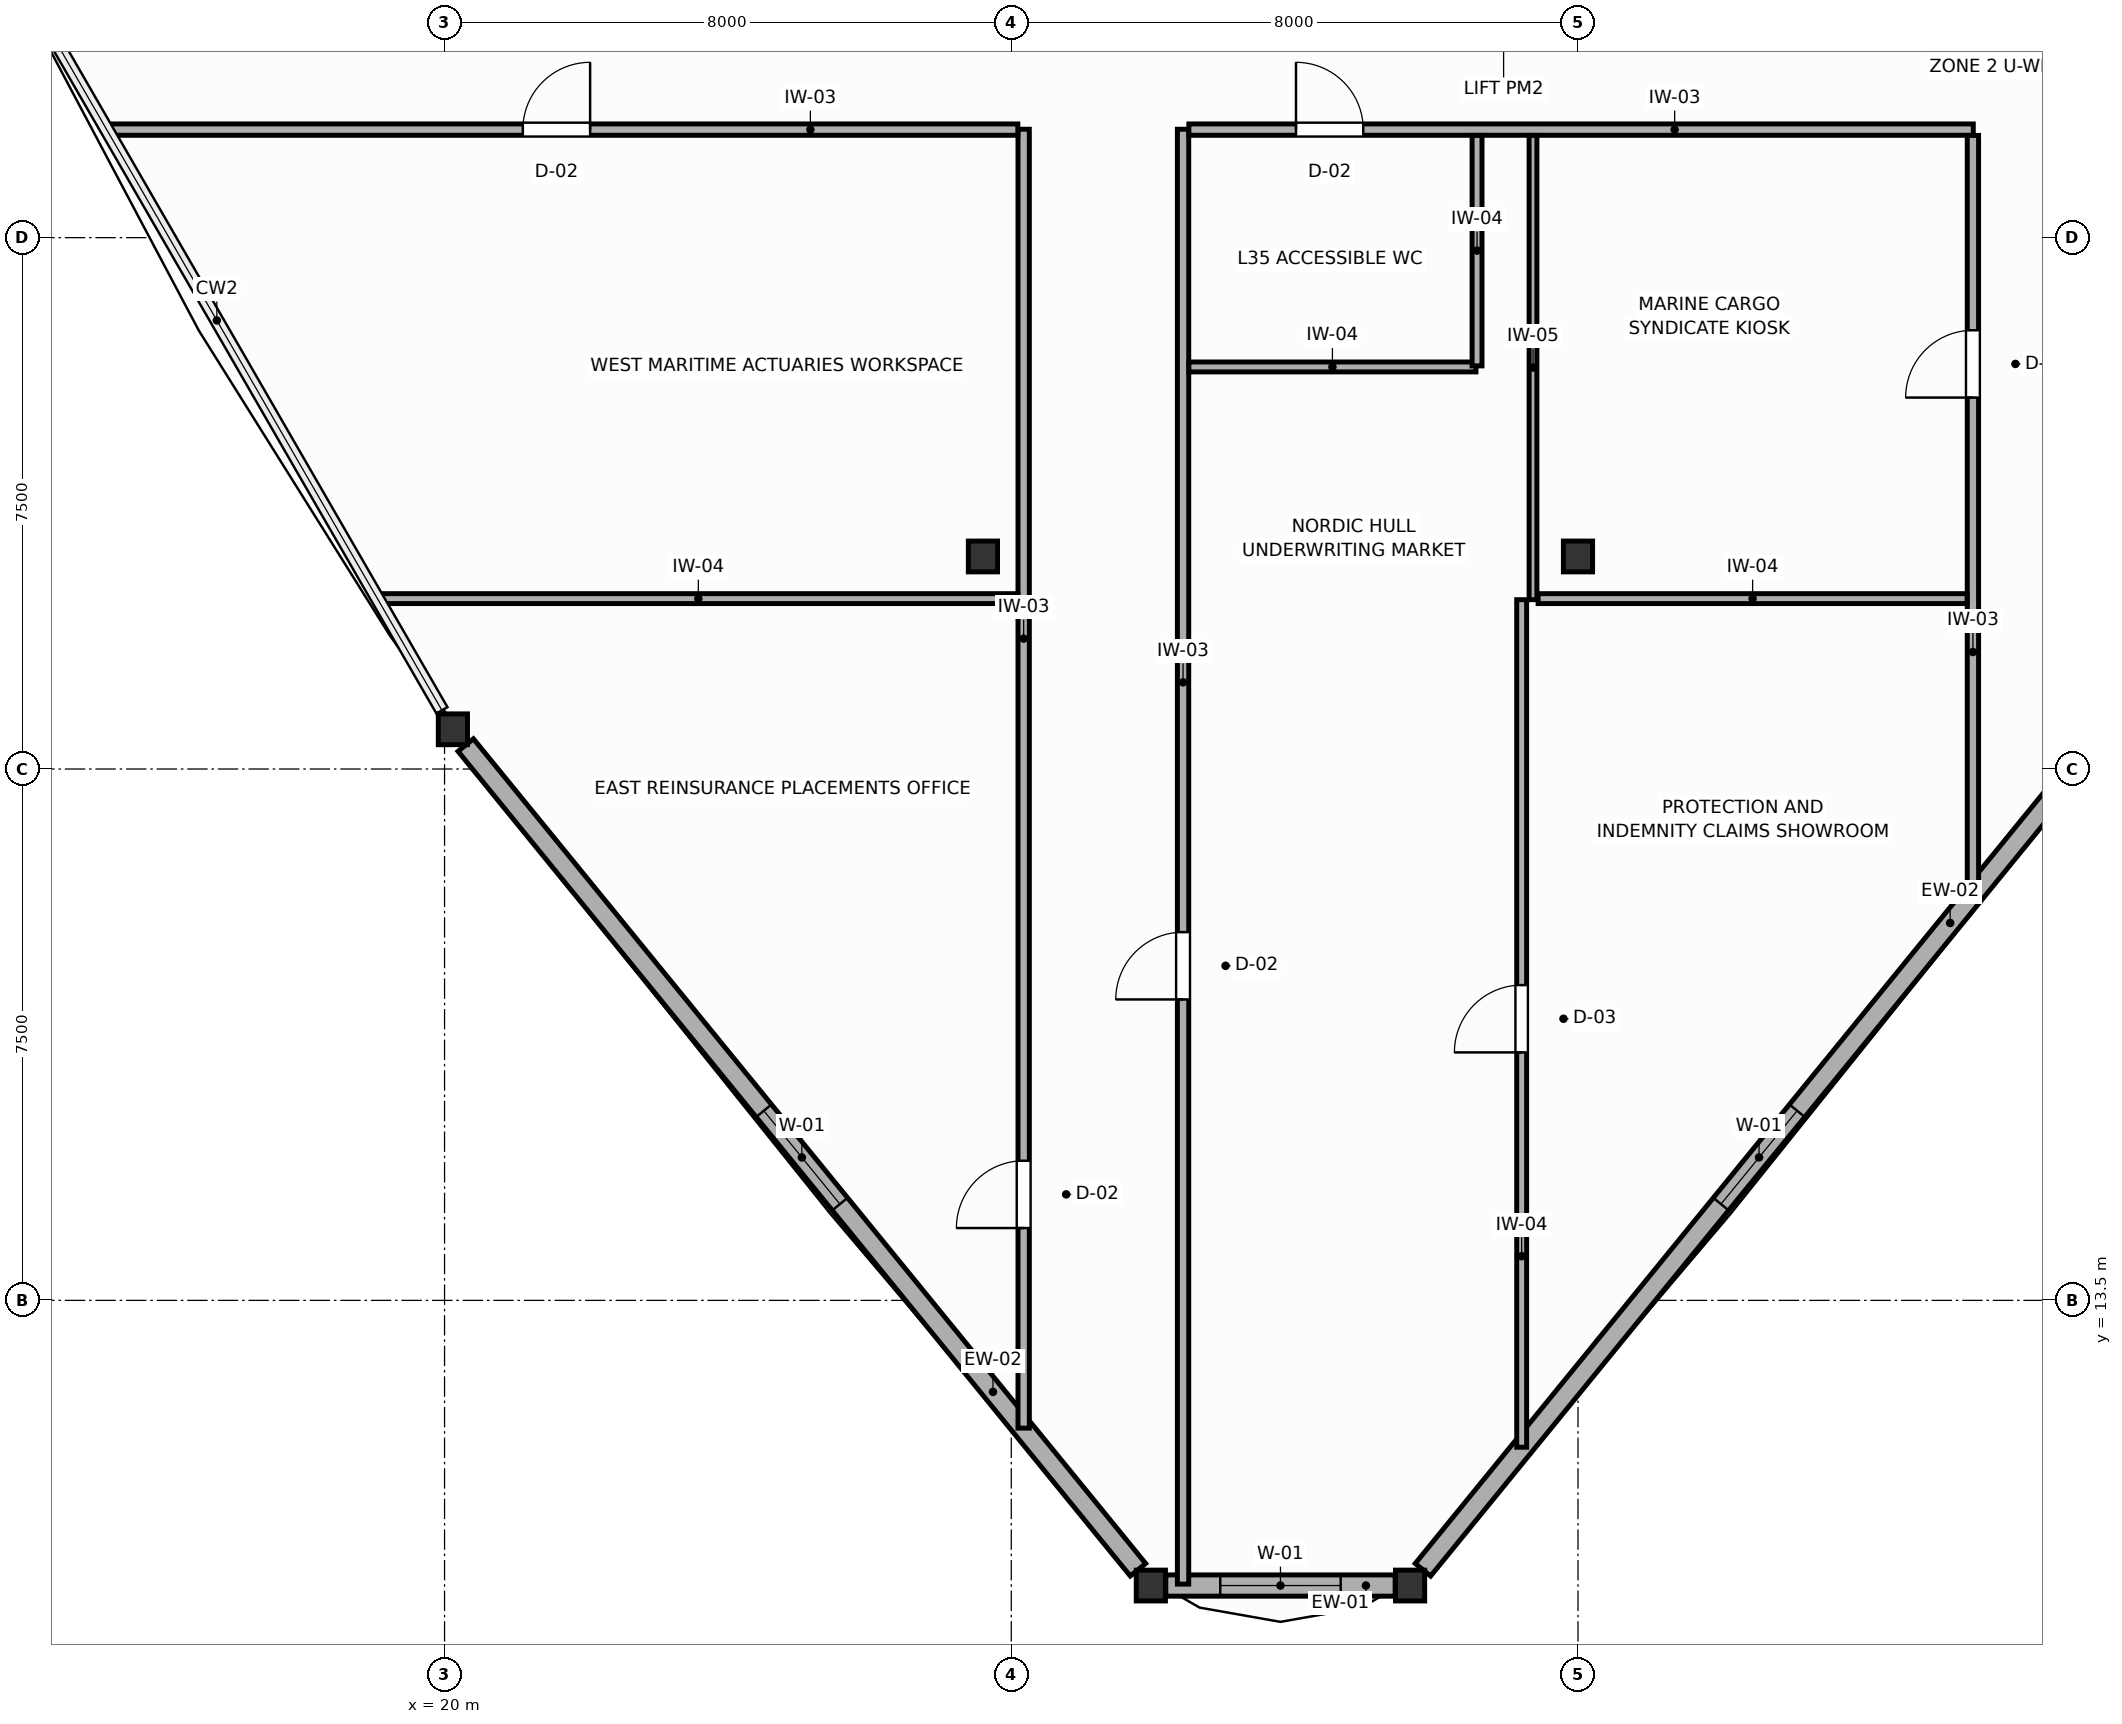
"""IFC4 building model, lengths in metres.
Left out: names, types, materials, properties, quantities, classifications, styles, units other than length and angle.
Written with IfcOpenShell. Run it as: python <this file> out.ifc"""

import sys

from ifc_helpers import new_model, si_unit, direction, frame, frame_2d, origin, origin_2d, place, context, subcontext, project, spatial, rectangle, i_section, extrude, source, transform, mapped, element, fill, save


model = new_model("IFC4")
c1 = context("Model", 3, precision=1e-05, world=origin(), true_north=direction((0.0, 1.0)))
c2 = subcontext(c1, "Body", "Model", "MODEL_VIEW")
j1 = project(units=[si_unit("LENGTHUNIT", "METRE"), si_unit("PLANEANGLEUNIT", "RADIAN")], contexts=[c1])
p1 = place(None, origin())
s1 = spatial("IfcSite", under=j1, at=p1, CompositionType="ELEMENT")
p2 = place(p1, origin())
s2 = spatial("IfcBuilding", under=s1, at=p2, CompositionType="ELEMENT")
p3 = place(p2, frame((0.0, 0.0, 139.8)))
s3 = spatial("IfcBuildingStorey", under=s2, at=p3, CompositionType="ELEMENT", Elevation=139.8)
m1 = source(origin(), c2, "Body", "SweptSolid", [
    extrude(i_section(OverallWidth=0.412, OverallDepth=0.435, WebThickness=0.033, FlangeThickness=0.053, FilletRadius=0.015, at=origin_2d()), origin(), (0.0, 0.0, 1.0), 3.6),
])
for number, where, z_axis, x_axis in (
    (1, (27.6, 24.0, 0.0), (0.0, 0.0, 1.0), (1.0, 0.0, 0.0)),
    (2, (36.0, 24.0, 0.0), (0.0, 0.0, 1.0), (1.0, 0.0, 0.0)),
    (3, (20.118, 21.561, 0.0), (0.0, 0.0, 1.0), (1.0, 0.0, 0.0)),
    (4, (29.97, 9.475, 0.0), (0.0, 0.0, 1.0), (1.0, 0.0, 0.0)),
    (5, (33.63, 9.475, 0.0), (0.0, 0.0, 1.0), (1.0, 0.0, 0.0)),
):
    element("IfcColumn", number, at=place(p3, frame(where, z_axis=z_axis, x_axis=x_axis)), inside=s3, PredefinedType="COLUMN", context=c2, shape_type="MappedRepresentation", body=[
        mapped(m1, transform((0.0, 0.0, 0.0), scale=1.0)),
    ])
p4 = place(p3, frame((20.299, 21.338, 0.0), z_axis=(0.0, 0.0, 1.0), x_axis=(0.631872666528, -0.775072211665, 0.0)))
e6 = element("IfcWall", 6, at=p4, inside=s3, PredefinedType="SOLIDWALL", context=c2, shape_type="SweptSolid", body=[
    extrude(rectangle(XDim=15.019, YDim=0.28, at=frame_2d((7.509, 0.0))), origin(), (0.0, 0.0, 1.0), 3.0),
])
p5 = place(p4, frame((6.659, 0.0, 0.75)))
e7 = element("IfcOpeningElement", 7, at=p5, cuts=e6, PredefinedType="OPENING", context=c2, shape_type="SweptSolid", body=[
    extrude(rectangle(XDim=1.7, YDim=1.75, at=frame_2d((0.85, 0.875))), frame((0.0, 0.15, 0.0), z_axis=(0.0, -1.0, 0.0), x_axis=(1.0, 0.0, 0.0)), (0.0, 0.0, 1.0), 0.3),
])
p6 = place(p3, frame((30.181, 9.475, 0.0), z_axis=(0.0, 0.0, 1.0), x_axis=(1.0, 0.0, 0.0)))
e8 = element("IfcWall", 8, at=p6, inside=s3, PredefinedType="SOLIDWALL", context=c2, shape_type="SweptSolid", body=[
    extrude(rectangle(XDim=3.237, YDim=0.3, at=frame_2d((1.619, 0.0))), origin(), (0.0, 0.0, 1.0), 3.0),
])
p7 = place(p6, frame((0.769, 0.0, 0.75)))
e9 = element("IfcOpeningElement", 9, at=p7, cuts=e8, PredefinedType="OPENING", context=c2, shape_type="SweptSolid", body=[
    extrude(rectangle(XDim=1.7, YDim=1.75, at=frame_2d((0.85, 0.875))), frame((0.0, 0.16, 0.0), z_axis=(0.0, -1.0, 0.0), x_axis=(1.0, 0.0, 0.0)), (0.0, 0.0, 1.0), 0.32),
])
p8 = place(p3, frame((33.811, 9.698, 0.0), z_axis=(0.0, 0.0, 1.0), x_axis=(0.631882431987, 0.775064250334, 0.0)))
e10 = element("IfcWall", 10, at=p8, inside=s3, PredefinedType="SOLIDWALL", context=c2, shape_type="SweptSolid", body=[
    extrude(rectangle(XDim=15.019, YDim=0.28, at=frame_2d((7.509, 0.0))), origin(), (0.0, 0.0, 1.0), 3.0),
])
p9 = place(p8, frame((6.659, 0.0, 0.75)))
e11 = element("IfcOpeningElement", 11, at=p9, cuts=e10, PredefinedType="OPENING", context=c2, shape_type="SweptSolid", body=[
    extrude(rectangle(XDim=1.7, YDim=1.75, at=frame_2d((0.85, 0.875))), frame((0.0, 0.15, 0.0), z_axis=(0.0, -1.0, 0.0), x_axis=(1.0, 0.0, 0.0)), (0.0, 0.0, 1.0), 0.3),
])
p10 = place(p3, frame((30.425, 9.495, 0.0), z_axis=(0.0, 0.0, 1.0), x_axis=(0.0, 1.0, 0.0)))
e12 = element("IfcWall", 12, at=p10, inside=s3, PredefinedType="PARTITIONING", context=c2, shape_type="SweptSolid", body=[
    extrude(rectangle(XDim=20.535, YDim=0.16, at=frame_2d((10.268, 0.0))), origin(), (0.0, 0.0, 1.0), 3.4),
])
p11 = place(p10, frame((8.252, 0.0, 0.0)))
e13 = element("IfcOpeningElement", 13, at=p11, cuts=e12, PredefinedType="OPENING", context=c2, shape_type="SweptSolid", body=[
    extrude(rectangle(XDim=0.95, YDim=2.05, at=frame_2d((0.475, 1.025))), frame((0.0, 0.09, 0.0), z_axis=(0.0, -1.0, 0.0), x_axis=(1.0, 0.0, 0.0)), (0.0, 0.0, 1.0), 0.18),
])
p12 = place(p3, frame((28.175, 11.697, 0.0), z_axis=(0.0, 0.0, 1.0), x_axis=(0.0, 1.0, 0.0)))
e14 = element("IfcWall", 14, at=p12, inside=s3, PredefinedType="PARTITIONING", context=c2, shape_type="SweptSolid", body=[
    extrude(rectangle(XDim=18.333, YDim=0.16, at=frame_2d((9.167, 0.0))), origin(), (0.0, 0.0, 1.0), 2.95),
])
p13 = place(p12, frame((2.824, 0.0, 0.0)))
e15 = element("IfcOpeningElement", 15, at=p13, cuts=e14, PredefinedType="OPENING", context=c2, shape_type="SweptSolid", body=[
    extrude(rectangle(XDim=0.95, YDim=2.05, at=frame_2d((0.475, 1.025))), frame((0.0, 0.09, 0.0), z_axis=(0.0, -1.0, 0.0), x_axis=(1.0, 0.0, 0.0)), (0.0, 0.0, 1.0), 0.18),
])
p14 = place(p3, frame((15.251, 30.025, 0.0), z_axis=(0.0, 0.0, 1.0), x_axis=(1.0, 0.0, 0.0)))
e16 = element("IfcWall", 16, at=p14, inside=s3, PredefinedType="PARTITIONING", context=c2, shape_type="SweptSolid", body=[
    extrude(rectangle(XDim=12.842, YDim=0.16, at=frame_2d((6.421, 0.0))), origin(), (0.0, 0.0, 1.0), 3.4),
])
p15 = place(p14, frame((5.854, 0.0, 0.0)))
e17 = element("IfcOpeningElement", 17, at=p15, cuts=e16, PredefinedType="OPENING", context=c2, shape_type="SweptSolid", body=[
    extrude(rectangle(XDim=0.95, YDim=2.05, at=frame_2d((0.475, 1.025))), frame((0.0, 0.09, 0.0), z_axis=(0.0, -1.0, 0.0), x_axis=(1.0, 0.0, 0.0)), (0.0, 0.0, 1.0), 0.18),
])
p16 = place(p3, frame((30.507, 30.025, 0.0), z_axis=(0.0, 0.0, 1.0), x_axis=(1.0, 0.0, 0.0)))
e18 = element("IfcWall", 18, at=p16, inside=s3, PredefinedType="PARTITIONING", context=c2, shape_type="SweptSolid", body=[
    extrude(rectangle(XDim=11.073, YDim=0.16, at=frame_2d((5.537, 0.0))), origin(), (0.0, 0.0, 1.0), 3.4),
])
p17 = place(p16, frame((1.512, 0.0, 0.0)))
e19 = element("IfcOpeningElement", 19, at=p17, cuts=e18, PredefinedType="OPENING", context=c2, shape_type="SweptSolid", body=[
    extrude(rectangle(XDim=0.95, YDim=2.05, at=frame_2d((0.475, 1.025))), frame((0.0, 0.09, 0.0), z_axis=(0.0, -1.0, 0.0), x_axis=(1.0, 0.0, 0.0)), (0.0, 0.0, 1.0), 0.18),
])
p18 = place(p3, frame((41.575, 19.241, 0.0), z_axis=(0.0, 0.0, 1.0), x_axis=(0.0, 1.0, 0.0)))
e20 = element("IfcWall", 20, at=p18, inside=s3, PredefinedType="PARTITIONING", context=c2, shape_type="SweptSolid", body=[
    extrude(rectangle(XDim=10.702, YDim=0.16, at=frame_2d((5.351, 0.0))), origin(), (0.0, 0.0, 1.0), 3.4),
])
p19 = place(p18, frame((7.002, 0.0, 0.0)))
e21 = element("IfcOpeningElement", 21, at=p19, cuts=e20, PredefinedType="OPENING", context=c2, shape_type="SweptSolid", body=[
    extrude(rectangle(XDim=0.95, YDim=2.05, at=frame_2d((0.475, 1.025))), frame((0.0, 0.09, 0.0), z_axis=(0.0, -1.0, 0.0), x_axis=(1.0, 0.0, 0.0)), (0.0, 0.0, 1.0), 0.18),
])
p20 = place(p3, frame((35.205, 11.427, 0.0), z_axis=(0.0, 0.0, 1.0), x_axis=(0.0, 1.0, 0.0)))
e22 = element("IfcWall", 22, at=p20, inside=s3, PredefinedType="PARTITIONING", context=c2, shape_type="SweptSolid", body=[
    extrude(rectangle(XDim=11.963, YDim=0.14, at=frame_2d((5.981, 0.0))), origin(), (0.0, 0.0, 1.0), 2.95),
])
p21 = place(p20, frame((5.573, 0.0, 0.0)))
e23 = element("IfcOpeningElement", 23, at=p21, cuts=e22, PredefinedType="OPENING", context=c2, shape_type="SweptSolid", body=[
    extrude(rectangle(XDim=0.95, YDim=2.05, at=frame_2d((0.475, 1.025))), frame((0.0, 0.08, 0.0), z_axis=(0.0, -1.0, 0.0), x_axis=(1.0, 0.0, 0.0)), (0.0, 0.0, 1.0), 0.16),
])
p22 = place(p3, frame((19.073, 23.405, 0.0), z_axis=(0.0, 0.0, 1.0), x_axis=(1.0, 0.0, 0.0)))
e24 = element("IfcWall", 24, at=p22, inside=s3, PredefinedType="PARTITIONING", context=c2, shape_type="SweptSolid", body=[
    extrude(rectangle(XDim=9.02, YDim=0.14, at=frame_2d((4.51, 0.0))), origin(), (0.0, 0.0, 1.0), 3.4),
])
p23 = place(p3, frame((35.365, 23.39, 0.0), z_axis=(0.0, 0.0, 1.0), x_axis=(0.0, 1.0, 0.0)))
e25 = element("IfcWall", 25, at=p23, inside=s3, PredefinedType="MOVABLE", context=c2, shape_type="SweptSolid", body=[
    extrude(rectangle(XDim=6.553, YDim=0.11, at=frame_2d((3.277, 0.0))), origin(), (0.0, 0.0, 1.0), 3.4),
])
p24 = place(p3, frame((35.437, 23.405, 0.0), z_axis=(0.0, 0.0, 1.0), x_axis=(1.0, 0.0, 0.0)))
e26 = element("IfcWall", 26, at=p24, inside=s3, PredefinedType="PARTITIONING", context=c2, shape_type="SweptSolid", body=[
    extrude(rectangle(XDim=6.056, YDim=0.14, at=frame_2d((3.028, 0.0))), origin(), (0.0, 0.0, 1.0), 3.4),
])
p25 = place(p3, frame((30.507, 26.675, 0.0), z_axis=(0.0, 0.0, 1.0), x_axis=(1.0, 0.0, 0.0)))
e27 = element("IfcWall", 27, at=p25, inside=s3, PredefinedType="PARTITIONING", context=c2, shape_type="SweptSolid", body=[
    extrude(rectangle(XDim=4.053, YDim=0.14, at=frame_2d((2.026, 0.0))), origin(), (0.0, 0.0, 1.0), 3.4),
])
p26 = place(p3, frame((34.575, 26.69, 0.0), z_axis=(0.0, 0.0, 1.0), x_axis=(0.0, 1.0, 0.0)))
e28 = element("IfcWall", 28, at=p26, inside=s3, PredefinedType="PARTITIONING", context=c2, shape_type="SweptSolid", body=[
    extrude(rectangle(XDim=3.253, YDim=0.14, at=frame_2d((1.626, 0.0))), origin(), (0.0, 0.0, 1.0), 3.4),
])
p27 = place(p5, origin())
e29 = element("IfcWindow", 29, at=p27, inside=s3, PartitioningType="SINGLE_PANEL", PredefinedType="WINDOW", context=c2, shape_type="SweptSolid", body=[
    extrude(rectangle(XDim=1.7, YDim=1.75, at=frame_2d((0.85, 0.875))), frame((0.0, 0.03, 0.0), z_axis=(0.0, -1.0, 0.0), x_axis=(1.0, 0.0, 0.0)), (0.0, 0.0, 1.0), 0.06),
])
fill(e7, e29)
p28 = place(p7, origin())
e30 = element("IfcWindow", 30, at=p28, inside=s3, PartitioningType="SINGLE_PANEL", PredefinedType="WINDOW", context=c2, shape_type="SweptSolid", body=[
    extrude(rectangle(XDim=1.7, YDim=1.75, at=frame_2d((0.85, 0.875))), frame((0.0, 0.03, 0.0), z_axis=(0.0, -1.0, 0.0), x_axis=(1.0, 0.0, 0.0)), (0.0, 0.0, 1.0), 0.06),
])
fill(e9, e30)
p29 = place(p9, origin())
e31 = element("IfcWindow", 31, at=p29, inside=s3, PartitioningType="SINGLE_PANEL", PredefinedType="WINDOW", context=c2, shape_type="SweptSolid", body=[
    extrude(rectangle(XDim=1.7, YDim=1.75, at=frame_2d((0.85, 0.875))), frame((0.0, 0.03, 0.0), z_axis=(0.0, -1.0, 0.0), x_axis=(1.0, 0.0, 0.0)), (0.0, 0.0, 1.0), 0.06),
])
fill(e11, e31)
p30 = place(p11, origin())
e32 = element("IfcDoor", 32, at=p30, inside=s3, OperationType="SINGLE_SWING_LEFT", PredefinedType="DOOR", context=c2, shape_type="SweptSolid", body=[
    extrude(rectangle(XDim=0.95, YDim=2.05, at=frame_2d((0.475, 1.025))), frame((0.0, 0.025, 0.0), z_axis=(0.0, -1.0, 0.0), x_axis=(1.0, 0.0, 0.0)), (0.0, 0.0, 1.0), 0.05),
])
fill(e13, e32)
p31 = place(p13, origin())
e33 = element("IfcDoor", 33, at=p31, inside=s3, OperationType="SINGLE_SWING_LEFT", PredefinedType="DOOR", context=c2, shape_type="SweptSolid", body=[
    extrude(rectangle(XDim=0.95, YDim=2.05, at=frame_2d((0.475, 1.025))), frame((0.0, 0.025, 0.0), z_axis=(0.0, -1.0, 0.0), x_axis=(1.0, 0.0, 0.0)), (0.0, 0.0, 1.0), 0.05),
])
fill(e15, e33)
p32 = place(p15, origin())
e34 = element("IfcDoor", 34, at=p32, inside=s3, OperationType="SINGLE_SWING_RIGHT", PredefinedType="DOOR", context=c2, shape_type="SweptSolid", body=[
    extrude(rectangle(XDim=0.95, YDim=2.05, at=frame_2d((0.475, 1.025))), frame((0.0, 0.025, 0.0), z_axis=(0.0, -1.0, 0.0), x_axis=(1.0, 0.0, 0.0)), (0.0, 0.0, 1.0), 0.05),
])
fill(e17, e34)
p33 = place(p17, origin())
e35 = element("IfcDoor", 35, at=p33, inside=s3, OperationType="SINGLE_SWING_LEFT", PredefinedType="DOOR", context=c2, shape_type="SweptSolid", body=[
    extrude(rectangle(XDim=0.95, YDim=2.05, at=frame_2d((0.475, 1.025))), frame((0.0, 0.025, 0.0), z_axis=(0.0, -1.0, 0.0), x_axis=(1.0, 0.0, 0.0)), (0.0, 0.0, 1.0), 0.05),
])
fill(e19, e35)
p34 = place(p19, origin())
e36 = element("IfcDoor", 36, at=p34, inside=s3, OperationType="SINGLE_SWING_LEFT", PredefinedType="DOOR", context=c2, shape_type="SweptSolid", body=[
    extrude(rectangle(XDim=0.95, YDim=2.05, at=frame_2d((0.475, 1.025))), frame((0.0, 0.025, 0.0), z_axis=(0.0, -1.0, 0.0), x_axis=(1.0, 0.0, 0.0)), (0.0, 0.0, 1.0), 0.05),
])
fill(e21, e36)
p35 = place(p21, origin())
e37 = element("IfcDoor", 37, at=p35, inside=s3, OperationType="SINGLE_SWING_LEFT", PredefinedType="DOOR", context=c2, shape_type="SweptSolid", body=[
    extrude(rectangle(XDim=0.95, YDim=2.05, at=frame_2d((0.475, 1.025))), frame((0.0, 0.025, 0.0), z_axis=(0.0, -1.0, 0.0), x_axis=(1.0, 0.0, 0.0)), (0.0, 0.0, 1.0), 0.05),
])
fill(e23, e37)
save(model, sys.argv[1])
